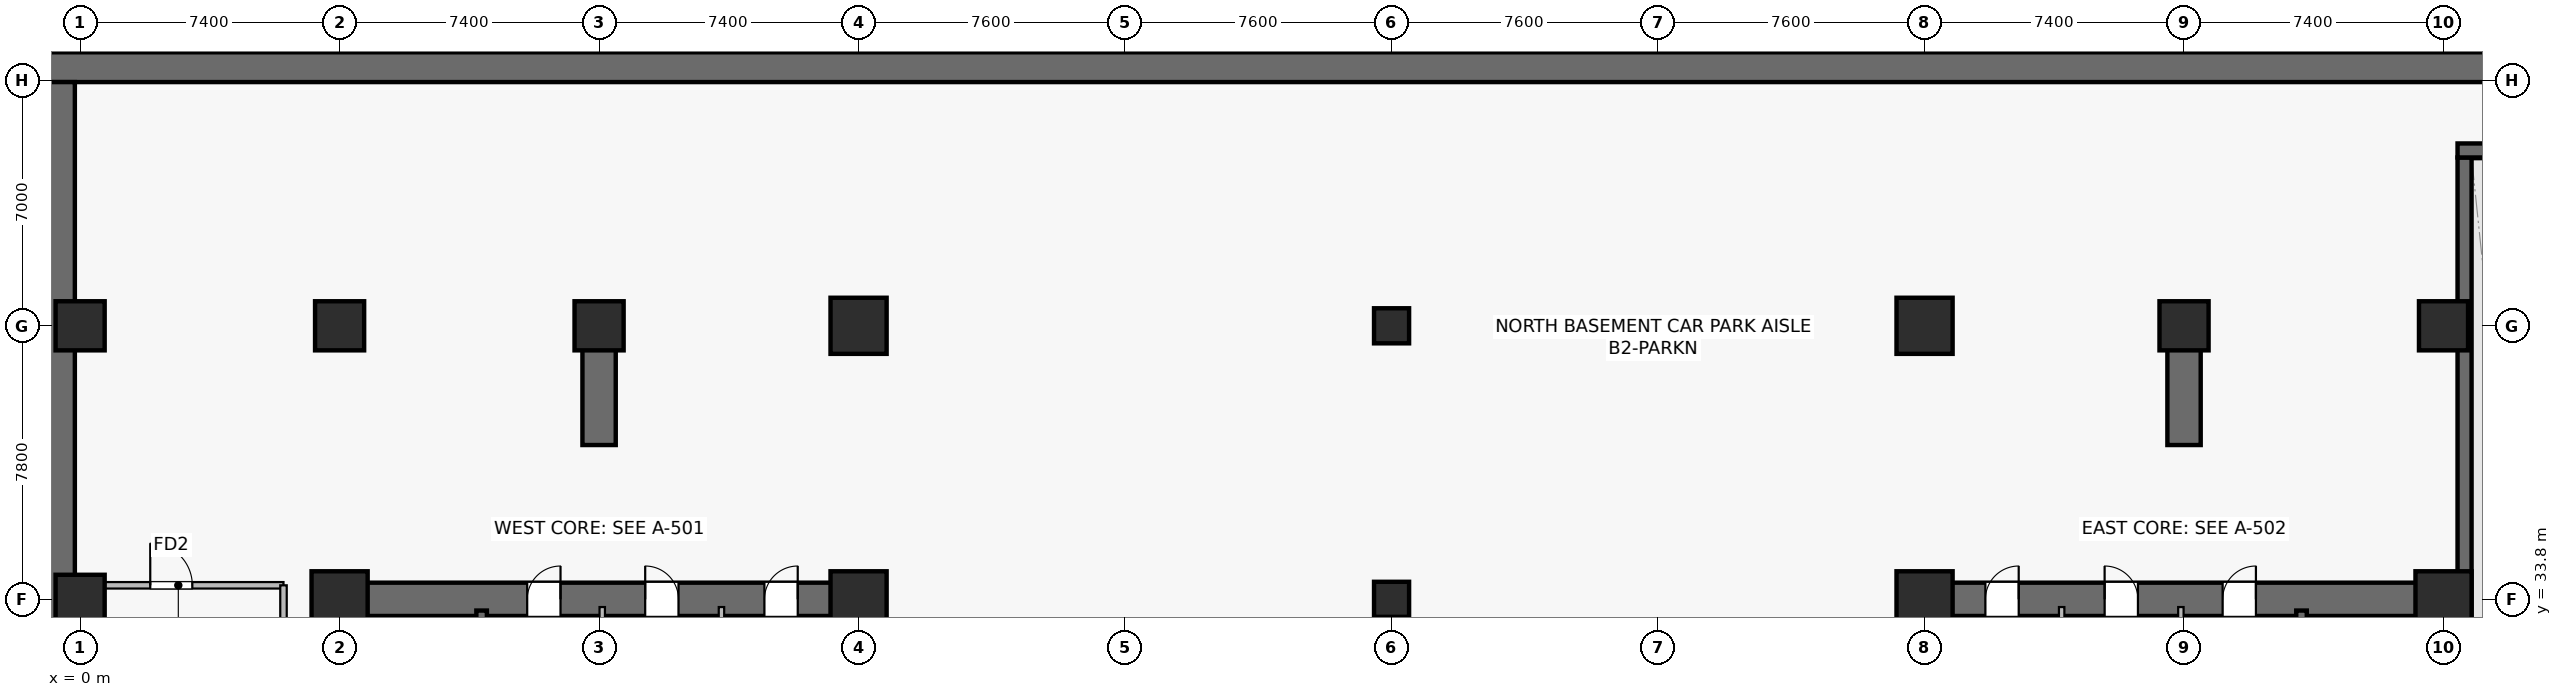
"""IFC4 building model, lengths in metres.
Left out: names, types, materials, properties, quantities, classifications, styles, units other than length and angle.
Written with IfcOpenShell. Run it as: python <this file> out.ifc"""

import sys

from ifc_helpers import new_model, si_unit, direction, frame, frame_2d, origin, origin_2d, place, context, subcontext, project, spatial, rectangle, extrude, source, transform, mapped, element, fill, save


model = new_model("IFC4")
c1 = context("Model", 3, precision=1e-05, world=origin(), true_north=direction((0.0, 1.0)))
c2 = subcontext(c1, "Body", "Model", "MODEL_VIEW")
j1 = project(units=[si_unit("LENGTHUNIT", "METRE"), si_unit("PLANEANGLEUNIT", "RADIAN")], contexts=[c1])
p1 = place(None, origin())
s1 = spatial("IfcSite", under=j1, at=p1, CompositionType="ELEMENT")
p2 = place(p1, origin())
s2 = spatial("IfcBuilding", under=s1, at=p2, CompositionType="ELEMENT")
p3 = place(p2, frame((0.0, 0.0, -9.6)))
s3 = spatial("IfcBuildingStorey", under=s2, at=p3, CompositionType="ELEMENT", Elevation=-9.6)
p4 = place(p3, frame((6.925, 33.8, 0.0), z_axis=(0.0, 0.0, 1.0), x_axis=(1.0, 0.0, 0.0)))
e1 = element("IfcWall", 1, at=p4, inside=s3, PredefinedType="SHEAR", context=c2, shape_type="SweptSolid", body=[
    extrude(rectangle(XDim=15.75, YDim=0.95, at=frame_2d((7.875, 0.0))), origin(), (0.0, 0.0, 1.0), 4.42),
])
p5 = place(p4, frame((5.825, 0.0, 0.0)))
e2 = element("IfcOpeningElement", 2, at=p5, cuts=e1, PredefinedType="OPENING", context=c2, shape_type="SweptSolid", body=[
    extrude(rectangle(XDim=0.95, YDim=2.15, at=frame_2d((0.475, 1.075))), frame((0.0, 0.485, 0.0), z_axis=(0.0, -1.0, 0.0), x_axis=(1.0, 0.0, 0.0)), (0.0, 0.0, 1.0), 0.97),
])
p6 = place(p4, frame((9.19, 0.0, 0.0)))
e3 = element("IfcOpeningElement", 3, at=p6, cuts=e1, PredefinedType="OPENING", context=c2, shape_type="SweptSolid", body=[
    extrude(rectangle(XDim=0.95, YDim=2.15, at=frame_2d((0.475, 1.075))), frame((0.0, 0.485, 0.0), z_axis=(0.0, -1.0, 0.0), x_axis=(1.0, 0.0, 0.0)), (0.0, 0.0, 1.0), 0.97),
])
p7 = place(p4, frame((12.59, 0.0, 0.0)))
e4 = element("IfcOpeningElement", 4, at=p7, cuts=e1, PredefinedType="OPENING", context=c2, shape_type="SweptSolid", body=[
    extrude(rectangle(XDim=0.95, YDim=2.15, at=frame_2d((0.475, 1.075))), frame((0.0, 0.485, 0.0), z_axis=(0.0, -1.0, 0.0), x_axis=(1.0, 0.0, 0.0)), (0.0, 0.0, 1.0), 0.97),
])
p8 = place(p3, frame((7.4, 15.275, 0.0), z_axis=(0.0, 0.0, 1.0), x_axis=(0.0, 1.0, 0.0)))
e5 = element("IfcWall", 5, at=p8, inside=s3, PredefinedType="SHEAR", context=c2, shape_type="SweptSolid", body=[
    extrude(rectangle(XDim=18.05, YDim=0.95, at=frame_2d((9.025, 0.0))), origin(), (0.0, 0.0, 1.0), 4.42),
])
p9 = place(p3, frame((22.2, 15.275, 0.0), z_axis=(0.0, 0.0, 1.0), x_axis=(0.0, 1.0, 0.0)))
e6 = element("IfcWall", 6, at=p9, inside=s3, PredefinedType="SHEAR", context=c2, shape_type="SweptSolid", body=[
    extrude(rectangle(XDim=18.05, YDim=0.95, at=frame_2d((9.025, 0.0))), origin(), (0.0, 0.0, 1.0), 4.42),
])
p10 = place(p9, frame((3.275, 0.0, 0.0)))
e7 = element("IfcOpeningElement", 7, at=p10, cuts=e6, PredefinedType="OPENING", context=c2, shape_type="SweptSolid", body=[
    extrude(rectangle(XDim=1.42, YDim=2.2, at=frame_2d((0.71, 1.1))), frame((0.0, 0.485, 0.0), z_axis=(0.0, -1.0, 0.0), x_axis=(1.0, 0.0, 0.0)), (0.0, 0.0, 1.0), 0.97),
])
p11 = place(p3, frame((11.45, 24.85, 0.0), z_axis=(0.0, 0.0, 1.0), x_axis=(0.0, 1.0, 0.0)))
e8 = element("IfcWall", 8, at=p11, inside=s3, PredefinedType="SHEAR", context=c2, shape_type="SweptSolid", body=[
    extrude(rectangle(XDim=8.63, YDim=0.3, at=frame_2d((4.315, 0.0))), origin(), (0.0, 0.0, 1.0), 4.42),
])
p12 = place(p11, frame((0.42, 0.0, 0.0)))
e9 = element("IfcOpeningElement", 9, at=p12, cuts=e8, PredefinedType="OPENING", context=c2, shape_type="SweptSolid", body=[
    extrude(rectangle(XDim=1.1, YDim=2.15, at=frame_2d((0.55, 1.075))), frame((0.0, 0.16, 0.0), z_axis=(0.0, -1.0, 0.0), x_axis=(1.0, 0.0, 0.0)), (0.0, 0.0, 1.0), 0.32),
])
p13 = place(p3, frame((52.125, 33.8, 0.0), z_axis=(0.0, 0.0, 1.0), x_axis=(1.0, 0.0, 0.0)))
e10 = element("IfcWall", 10, at=p13, inside=s3, PredefinedType="SHEAR", context=c2, shape_type="SweptSolid", body=[
    extrude(rectangle(XDim=15.75, YDim=0.95, at=frame_2d((7.875, 0.0))), origin(), (0.0, 0.0, 1.0), 4.42),
])
p14 = place(p13, frame((8.975, 0.0, 0.0)))
e11 = element("IfcOpeningElement", 11, at=p14, cuts=e10, PredefinedType="OPENING", context=c2, shape_type="SweptSolid", body=[
    extrude(rectangle(XDim=0.95, YDim=2.15, at=frame_2d((0.475, 1.075))), frame((0.0, 0.485, 0.0), z_axis=(0.0, -1.0, 0.0), x_axis=(1.0, 0.0, 0.0)), (0.0, 0.0, 1.0), 0.97),
])
p15 = place(p13, frame((5.61, 0.0, 0.0)))
e12 = element("IfcOpeningElement", 12, at=p15, cuts=e10, PredefinedType="OPENING", context=c2, shape_type="SweptSolid", body=[
    extrude(rectangle(XDim=0.95, YDim=2.15, at=frame_2d((0.475, 1.075))), frame((0.0, 0.485, 0.0), z_axis=(0.0, -1.0, 0.0), x_axis=(1.0, 0.0, 0.0)), (0.0, 0.0, 1.0), 0.97),
])
p16 = place(p13, frame((2.21, 0.0, 0.0)))
e13 = element("IfcOpeningElement", 13, at=p16, cuts=e10, PredefinedType="OPENING", context=c2, shape_type="SweptSolid", body=[
    extrude(rectangle(XDim=0.95, YDim=2.15, at=frame_2d((0.475, 1.075))), frame((0.0, 0.485, 0.0), z_axis=(0.0, -1.0, 0.0), x_axis=(1.0, 0.0, 0.0)), (0.0, 0.0, 1.0), 0.97),
])
p17 = place(p3, frame((52.6, 15.275, 0.0), z_axis=(0.0, 0.0, 1.0), x_axis=(0.0, 1.0, 0.0)))
e14 = element("IfcWall", 14, at=p17, inside=s3, PredefinedType="SHEAR", context=c2, shape_type="SweptSolid", body=[
    extrude(rectangle(XDim=18.05, YDim=0.95, at=frame_2d((9.025, 0.0))), origin(), (0.0, 0.0, 1.0), 4.42),
])
p18 = place(p17, frame((3.275, 0.0, 0.0)))
e15 = element("IfcOpeningElement", 15, at=p18, cuts=e14, PredefinedType="OPENING", context=c2, shape_type="SweptSolid", body=[
    extrude(rectangle(XDim=1.42, YDim=2.2, at=frame_2d((0.71, 1.1))), frame((0.0, 0.485, 0.0), z_axis=(0.0, -1.0, 0.0), x_axis=(1.0, 0.0, 0.0)), (0.0, 0.0, 1.0), 0.97),
])
p19 = place(p3, frame((67.4, 15.275, 0.0), z_axis=(0.0, 0.0, 1.0), x_axis=(0.0, 1.0, 0.0)))
e16 = element("IfcWall", 16, at=p19, inside=s3, PredefinedType="SHEAR", context=c2, shape_type="SweptSolid", body=[
    extrude(rectangle(XDim=18.05, YDim=0.95, at=frame_2d((9.025, 0.0))), origin(), (0.0, 0.0, 1.0), 4.42),
])
p20 = place(p3, frame((63.35, 24.85, 0.0), z_axis=(0.0, 0.0, 1.0), x_axis=(0.0, 1.0, 0.0)))
e17 = element("IfcWall", 17, at=p20, inside=s3, PredefinedType="SHEAR", context=c2, shape_type="SweptSolid", body=[
    extrude(rectangle(XDim=8.63, YDim=0.3, at=frame_2d((4.315, 0.0))), origin(), (0.0, 0.0, 1.0), 4.42),
])
p21 = place(p20, frame((0.42, 0.0, 0.0)))
e18 = element("IfcOpeningElement", 18, at=p21, cuts=e17, PredefinedType="OPENING", context=c2, shape_type="SweptSolid", body=[
    extrude(rectangle(XDim=1.1, YDim=2.15, at=frame_2d((0.55, 1.075))), frame((0.0, 0.16, 0.0), z_axis=(0.0, -1.0, 0.0), x_axis=(1.0, 0.0, 0.0)), (0.0, 0.0, 1.0), 0.32),
])
for number, where, z_axis, x_axis in (
    (19, (14.8, 38.2, 0.0), (0.0, 0.0, 1.0), (0.0, 1.0, 0.0)),
    (20, (60.0, 38.2, 0.0), (0.0, 0.0, 1.0), (0.0, 1.0, 0.0)),
):
    element("IfcWall", number, at=place(p3, frame(where, z_axis=z_axis, x_axis=x_axis)), inside=s3, PredefinedType="SHEAR", context=c2, shape_type="SweptSolid", body=[
        extrude(rectangle(XDim=3.1, YDim=0.95, at=frame_2d((1.55, 0.0))), origin(), (0.0, 0.0, 1.0), 4.42),
    ])
p22 = place(p3, frame((-1.0, 48.975, 0.0), z_axis=(0.0, 0.0, 1.0), x_axis=(1.0, 0.0, 0.0)))
e21 = element("IfcWall", 21, at=p22, inside=s3, PredefinedType="SOLIDWALL", context=c2, shape_type="SweptSolid", body=[
    extrude(rectangle(XDim=76.8, YDim=0.85, at=frame_2d((38.4, 0.0))), origin(), (0.0, 0.0, 1.0), 4.42),
])
p23 = place(p3, frame((-0.575, 0.05, 0.0), z_axis=(0.0, 0.0, 1.0), x_axis=(0.0, 1.0, 0.0)))
e22 = element("IfcWall", 22, at=p23, inside=s3, PredefinedType="SOLIDWALL", context=c2, shape_type="SweptSolid", body=[
    extrude(rectangle(XDim=48.5, YDim=0.85, at=frame_2d((24.25, 0.0))), origin(), (0.0, 0.0, 1.0), 4.42),
])
p24 = place(p3, frame((68.0, 6.0, 0.0), z_axis=(0.0, 0.0, 1.0), x_axis=(0.0, 1.0, 0.0)))
e23 = element("IfcWall", 23, at=p24, inside=s3, PredefinedType="SHEAR", context=c2, shape_type="SweptSolid", body=[
    extrude(rectangle(XDim=40.4, YDim=0.4, at=frame_2d((20.2, 0.0))), origin(), (0.0, 0.0, 1.0), 4.42),
])
p25 = place(p3, frame((67.8, 46.6, 0.0), z_axis=(0.0, 0.0, 1.0), x_axis=(1.0, 0.0, 0.0)))
e24 = element("IfcWall", 24, at=p25, inside=s3, PredefinedType="SHEAR", context=c2, shape_type="SweptSolid", body=[
    extrude(rectangle(XDim=5.0, YDim=0.4, at=frame_2d((2.5, 0.0))), origin(), (0.0, 0.0, 1.0), 4.42),
])
m1 = source(origin(), c2, "Body", "SweptSolid", [
    extrude(rectangle(XDim=1.6, YDim=1.6, at=origin_2d()), origin(), (0.0, 0.0, 1.0), 4.8),
])
for number, where, z_axis, x_axis in (
    (25, (7.4, 33.8, 0.0), (0.0, 0.0, 1.0), (1.0, 0.0, 0.0)),
    (26, (22.2, 33.8, 0.0), (0.0, 0.0, 1.0), (1.0, 0.0, 0.0)),
):
    element("IfcColumn", number, at=place(p3, frame(where, z_axis=z_axis, x_axis=x_axis)), inside=s3, PredefinedType="COLUMN", context=c2, shape_type="MappedRepresentation", body=[
        mapped(m1, transform((0.0, 0.0, 0.0), scale=1.0)),
    ])
m2 = source(origin(), c2, "Body", "SweptSolid", [
    extrude(rectangle(XDim=1.4, YDim=1.4, at=origin_2d()), origin(), (0.0, 0.0, 1.0), 4.8),
])
p26 = place(p3, frame((14.8, 41.6, 0.0), z_axis=(0.0, 0.0, 1.0), x_axis=(1.0, 0.0, 0.0)))
e27 = element("IfcColumn", 27, at=p26, inside=s3, PredefinedType="COLUMN", context=c2, shape_type="MappedRepresentation", body=[
    mapped(m2, transform((0.0, 0.0, 0.0), scale=1.0)),
])
for number, where, z_axis, x_axis in (
    (28, (22.2, 41.6, 0.0), (0.0, 0.0, 1.0), (1.0, 0.0, 0.0)),
    (29, (52.6, 33.8, 0.0), (0.0, 0.0, 1.0), (1.0, 0.0, 0.0)),
    (30, (67.4, 33.8, 0.0), (0.0, 0.0, 1.0), (1.0, 0.0, 0.0)),
    (31, (52.6, 41.6, 0.0), (0.0, 0.0, 1.0), (1.0, 0.0, 0.0)),
):
    element("IfcColumn", number, at=place(p3, frame(where, z_axis=z_axis, x_axis=x_axis)), inside=s3, PredefinedType="COLUMN", context=c2, shape_type="MappedRepresentation", body=[
        mapped(m1, transform((0.0, 0.0, 0.0), scale=1.0)),
    ])
for number, where, z_axis, x_axis in (
    (32, (60.0, 41.6, 0.0), (0.0, 0.0, 1.0), (1.0, 0.0, 0.0)),
    (33, (7.4, 41.6, 0.0), (0.0, 0.0, 1.0), (1.0, 0.0, 0.0)),
    (34, (67.4, 41.6, 0.0), (0.0, 0.0, 1.0), (1.0, 0.0, 0.0)),
    (35, (0.0, 33.8, 0.0), (0.0, 0.0, 1.0), (1.0, 0.0, 0.0)),
    (36, (0.0, 41.6, 0.0), (0.0, 0.0, 1.0), (1.0, 0.0, 0.0)),
):
    element("IfcColumn", number, at=place(p3, frame(where, z_axis=z_axis, x_axis=x_axis)), inside=s3, PredefinedType="COLUMN", context=c2, shape_type="MappedRepresentation", body=[
        mapped(m2, transform((0.0, 0.0, 0.0), scale=1.0)),
    ])
m3 = source(origin(), c2, "Body", "SweptSolid", [
    extrude(rectangle(XDim=1.0, YDim=1.0, at=origin_2d()), origin(), (0.0, 0.0, 1.0), 4.8),
])
for number, where, z_axis, x_axis in (
    (37, (37.4, 33.8, 0.0), (0.0, 0.0, 1.0), (1.0, 0.0, 0.0)),
    (38, (37.4, 41.6, 0.0), (0.0, 0.0, 1.0), (1.0, 0.0, 0.0)),
):
    element("IfcColumn", number, at=place(p3, frame(where, z_axis=z_axis, x_axis=x_axis)), inside=s3, PredefinedType="COLUMN", context=c2, shape_type="MappedRepresentation", body=[
        mapped(m3, transform((0.0, 0.0, 0.0), scale=1.0)),
    ])
p27 = place(p3, frame((14.89, 29.65, 0.0), z_axis=(0.0, 0.0, 1.0), x_axis=(0.0, 1.0, 0.0)))
e39 = element("IfcWall", 39, at=p27, inside=s3, PredefinedType="PLUMBINGWALL", context=c2, shape_type="SweptSolid", body=[
    extrude(rectangle(XDim=3.93, YDim=0.155, at=frame_2d((1.965, 0.0))), origin(), (0.0, 0.0, 1.0), 3.655),
])
p28 = place(p3, frame((18.29, 29.65, 0.0), z_axis=(0.0, 0.0, 1.0), x_axis=(0.0, 1.0, 0.0)))
e40 = element("IfcWall", 40, at=p28, inside=s3, PredefinedType="PLUMBINGWALL", context=c2, shape_type="SweptSolid", body=[
    extrude(rectangle(XDim=3.93, YDim=0.155, at=frame_2d((1.965, 0.0))), origin(), (0.0, 0.0, 1.0), 4.42),
])
p29 = place(p3, frame((59.91, 29.65, 0.0), z_axis=(0.0, 0.0, 1.0), x_axis=(0.0, 1.0, 0.0)))
e41 = element("IfcWall", 41, at=p29, inside=s3, PredefinedType="PLUMBINGWALL", context=c2, shape_type="SweptSolid", body=[
    extrude(rectangle(XDim=3.93, YDim=0.155, at=frame_2d((1.965, 0.0))), origin(), (0.0, 0.0, 1.0), 3.655),
])
p30 = place(p3, frame((56.51, 29.65, 0.0), z_axis=(0.0, 0.0, 1.0), x_axis=(0.0, 1.0, 0.0)))
e42 = element("IfcWall", 42, at=p30, inside=s3, PredefinedType="PLUMBINGWALL", context=c2, shape_type="SweptSolid", body=[
    extrude(rectangle(XDim=3.93, YDim=0.155, at=frame_2d((1.965, 0.0))), origin(), (0.0, 0.0, 1.0), 4.42),
])
p31 = place(p3, frame((-0.2, 34.2, 0.0), z_axis=(0.0, 0.0, 1.0), x_axis=(1.0, 0.0, 0.0)))
e43 = element("IfcWall", 43, at=p31, inside=s3, PredefinedType="SOLIDWALL", context=c2, shape_type="SweptSolid", body=[
    extrude(rectangle(XDim=6.0, YDim=0.185, at=frame_2d((3.0, 0.0))), origin(), (0.0, 0.0, 1.0), 3.805),
])
p32 = place(p31, frame((2.2, 0.0, 0.0)))
e44 = element("IfcOpeningElement", 44, at=p32, cuts=e43, PredefinedType="OPENING", context=c2, shape_type="SweptSolid", body=[
    extrude(rectangle(XDim=1.2, YDim=2.16, at=frame_2d((0.6, 1.08))), frame((0.0, 0.103, 0.0), z_axis=(0.0, -1.0, 0.0), x_axis=(1.0, 0.0, 0.0)), (0.0, 0.0, 1.0), 0.205),
])
p33 = place(p3, frame((5.8, 14.8, 0.0), z_axis=(0.0, 0.0, 1.0), x_axis=(0.0, 1.0, 0.0)))
e45 = element("IfcWall", 45, at=p33, inside=s3, PredefinedType="SOLIDWALL", context=c2, shape_type="SweptSolid", body=[
    extrude(rectangle(XDim=19.4, YDim=0.185, at=frame_2d((9.7, 0.0))), origin(), (0.0, 0.0, 1.0), 3.605),
])
m4 = source(origin(), c2, "Body", "SweptSolid", [
    extrude(rectangle(XDim=0.95, YDim=2.15, at=frame_2d((0.475, 1.075))), frame((0.0, 0.025, 0.0), z_axis=(0.0, -1.0, 0.0), x_axis=(1.0, 0.0, 0.0)), (0.0, 0.0, 1.0), 0.05),
])
p34 = place(p5, origin())
e46 = element("IfcDoor", 46, at=p34, inside=s3, OperationType="SINGLE_SWING_RIGHT", PredefinedType="DOOR", context=c2, shape_type="MappedRepresentation", body=[
    mapped(m4, transform((0.0, 0.0, 0.0), scale=1.0)),
])
fill(e2, e46)
p35 = place(p6, origin())
e47 = element("IfcDoor", 47, at=p35, inside=s3, OperationType="SINGLE_SWING_LEFT", PredefinedType="DOOR", context=c2, shape_type="MappedRepresentation", body=[
    mapped(m4, transform((0.0, 0.0, 0.0), scale=1.0)),
])
fill(e3, e47)
p36 = place(p7, origin())
e48 = element("IfcDoor", 48, at=p36, inside=s3, OperationType="SINGLE_SWING_RIGHT", PredefinedType="DOOR", context=c2, shape_type="MappedRepresentation", body=[
    mapped(m4, transform((0.0, 0.0, 0.0), scale=1.0)),
])
fill(e4, e48)
p37 = place(p14, origin())
e49 = element("IfcDoor", 49, at=p37, inside=s3, OperationType="SINGLE_SWING_RIGHT", PredefinedType="DOOR", context=c2, shape_type="MappedRepresentation", body=[
    mapped(m4, transform((0.0, 0.0, 0.0), scale=1.0)),
])
fill(e11, e49)
p38 = place(p15, origin())
e50 = element("IfcDoor", 50, at=p38, inside=s3, OperationType="SINGLE_SWING_LEFT", PredefinedType="DOOR", context=c2, shape_type="MappedRepresentation", body=[
    mapped(m4, transform((0.0, 0.0, 0.0), scale=1.0)),
])
fill(e12, e50)
p39 = place(p16, origin())
e51 = element("IfcDoor", 51, at=p39, inside=s3, OperationType="SINGLE_SWING_RIGHT", PredefinedType="DOOR", context=c2, shape_type="MappedRepresentation", body=[
    mapped(m4, transform((0.0, 0.0, 0.0), scale=1.0)),
])
fill(e13, e51)
m5 = source(origin(), c2, "Body", "SweptSolid", [
    extrude(rectangle(XDim=1.2, YDim=2.16, at=frame_2d((0.6, 1.08))), frame((0.0, 0.025, 0.0), z_axis=(0.0, -1.0, 0.0), x_axis=(1.0, 0.0, 0.0)), (0.0, 0.0, 1.0), 0.05),
])
p40 = place(p32, origin())
e52 = element("IfcDoor", 52, at=p40, inside=s3, OperationType="SINGLE_SWING_LEFT", PredefinedType="DOOR", context=c2, shape_type="MappedRepresentation", body=[
    mapped(m5, transform((0.0, 0.0, 0.0), scale=1.0)),
])
fill(e44, e52)
save(model, sys.argv[1])
